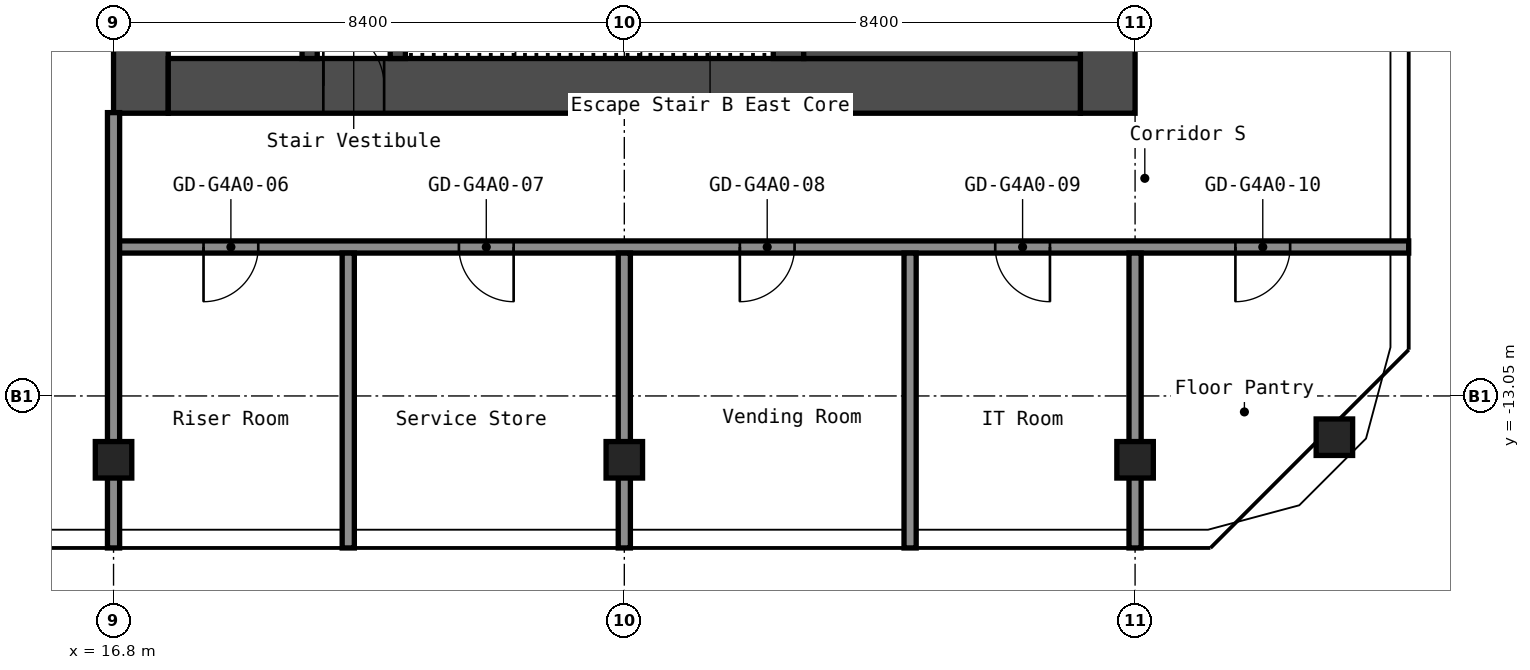
"""IFC4 building model, lengths in metres.
Left out: names, types, materials, properties, quantities, classifications, styles, units other than length and angle.
Written with IfcOpenShell. Run it as: python <this file> out.ifc"""

import sys

from ifc_helpers import new_model, si_unit, direction, frame, frame_2d, origin, origin_2d, place, context, subcontext, project, spatial, rectangle, hollow_rectangle, extrude, element, fill, save


model = new_model("IFC4")
c1 = context("Model", 3, precision=1e-05, world=origin(), true_north=direction((0.0, 1.0)))
c2 = subcontext(c1, "Body", "Model", "MODEL_VIEW")
j1 = project(units=[si_unit("LENGTHUNIT", "METRE"), si_unit("PLANEANGLEUNIT", "RADIAN")], contexts=[c1])
p1 = place(None, origin())
s1 = spatial("IfcSite", under=j1, at=p1, CompositionType="ELEMENT")
p2 = place(p1, origin())
s2 = spatial("IfcBuilding", under=s1, at=p2, CompositionType="ELEMENT")
p3 = place(p2, frame((0.0, 0.0, 186.6)))
s3 = spatial("IfcBuildingStorey", under=s2, at=p3, CompositionType="ELEMENT", Elevation=186.6)
for number, where, z_axis, x_axis in (
    (1, (16.8, -14.1, 0.0), (0.0, 0.0, 1.0), (1.0, 0.0, 0.0)),
    (2, (25.2, -14.1, 0.0), (0.0, 0.0, 1.0), (1.0, 0.0, 0.0)),
    (3, (33.6, -14.1, 0.0), (0.0, 0.0, 1.0), (1.0, 0.0, 0.0)),
    (4, (36.878, -13.729, 0.0), (0.0, 0.0, 1.0), (1.0, 0.0, 0.0)),
):
    element("IfcColumn", number, at=place(p3, frame(where, z_axis=z_axis, x_axis=x_axis)), inside=s3, PredefinedType="COLUMN", context=c2, shape_type="SweptSolid", body=[
        extrude(hollow_rectangle(XDim=0.6, YDim=0.6, WallThickness=0.025, InnerFilletRadius=0.038, OuterFilletRadius=0.062, at=origin_2d()), origin(), (0.0, 0.0, 1.0), 2.75),
    ])
p4 = place(p3, frame((17.25, -8.4, 0.0), z_axis=(0.0, 0.0, 1.0), x_axis=(0.0, 1.0, 0.0)))
e5 = element("IfcWall", 5, at=p4, inside=s3, PredefinedType="SHEAR", context=c2, shape_type="SweptSolid", body=[
    extrude(rectangle(XDim=16.8, YDim=0.9, at=frame_2d((8.4, 0.0))), origin(), (0.0, 0.0, 1.0), 2.75),
])
p5 = place(p4, frame((10.1, 0.0, 0.0)))
e6 = element("IfcOpeningElement", 6, at=p5, cuts=e5, PredefinedType="OPENING", context=c2, shape_type="SweptSolid", body=[
    extrude(rectangle(XDim=1.6, YDim=2.1, at=frame_2d((0.8, 1.05))), frame((0.0, 0.46, 0.0), z_axis=(0.0, -1.0, 0.0), x_axis=(1.0, 0.0, 0.0)), (0.0, 0.0, 1.0), 0.92),
])
p6 = place(p3, frame((33.15, -8.4, 0.0), z_axis=(0.0, 0.0, 1.0), x_axis=(0.0, 1.0, 0.0)))
e7 = element("IfcWall", 7, at=p6, inside=s3, PredefinedType="SHEAR", context=c2, shape_type="SweptSolid", body=[
    extrude(rectangle(XDim=16.8, YDim=0.9, at=frame_2d((8.4, 0.0))), origin(), (0.0, 0.0, 1.0), 2.75),
])
p7 = place(p3, frame((17.7, -7.95, 0.0), z_axis=(0.0, 0.0, 1.0), x_axis=(1.0, 0.0, 0.0)))
e8 = element("IfcWall", 8, at=p7, inside=s3, PredefinedType="SHEAR", context=c2, shape_type="SweptSolid", body=[
    extrude(rectangle(XDim=15.0, YDim=0.9, at=frame_2d((7.5, 0.0))), origin(), (0.0, 0.0, 1.0), 2.75),
])
p8 = place(p7, frame((2.55, 0.0, 0.0)))
e9 = element("IfcOpeningElement", 9, at=p8, cuts=e8, PredefinedType="OPENING", context=c2, shape_type="SweptSolid", body=[
    extrude(rectangle(XDim=1.0, YDim=2.1, at=frame_2d((0.5, 1.05))), frame((0.0, 0.46, 0.0), z_axis=(0.0, -1.0, 0.0), x_axis=(1.0, 0.0, 0.0)), (0.0, 0.0, 1.0), 0.92),
])
p9 = place(p3, frame((20.025, -7.5, 0.0), z_axis=(0.0, 0.0, 1.0), x_axis=(0.0, 1.0, 0.0)))
e10 = element("IfcWall", 10, at=p9, inside=s3, PredefinedType="SHEAR", context=c2, shape_type="SweptSolid", body=[
    extrude(rectangle(XDim=6.3, YDim=0.25, at=frame_2d((3.15, 0.0))), origin(), (0.0, 0.0, 1.0), 2.75),
])
p10 = place(p9, frame((2.4, 0.0, 0.0)))
e11 = element("IfcOpeningElement", 11, at=p10, cuts=e10, PredefinedType="OPENING", context=c2, shape_type="SweptSolid", body=[
    extrude(rectangle(XDim=1.0, YDim=2.1, at=frame_2d((0.5, 1.05))), frame((0.0, 0.135, 0.0), z_axis=(0.0, -1.0, 0.0), x_axis=(1.0, 0.0, 0.0)), (0.0, 0.0, 1.0), 0.27),
])
p11 = place(p3, frame((21.475, -7.5, 0.0), z_axis=(0.0, 0.0, 1.0), x_axis=(0.0, 1.0, 0.0)))
e12 = element("IfcWall", 12, at=p11, inside=s3, PredefinedType="SHEAR", context=c2, shape_type="SweptSolid", body=[
    extrude(rectangle(XDim=3.75, YDim=0.25, at=frame_2d((1.875, 0.0))), origin(), (0.0, 0.0, 1.0), 2.75),
])
p12 = place(p11, frame((1.3, 0.0, 0.0)))
e13 = element("IfcOpeningElement", 13, at=p12, cuts=e12, PredefinedType="OPENING", context=c2, shape_type="SweptSolid", body=[
    extrude(rectangle(XDim=1.2, YDim=2.1, at=frame_2d((0.6, 1.05))), frame((0.0, 0.135, 0.0), z_axis=(0.0, -1.0, 0.0), x_axis=(1.0, 0.0, 0.0)), (0.0, 0.0, 1.0), 0.27),
])
p13 = place(p3, frame((27.9, -7.5, 0.0), z_axis=(0.0, 0.0, 1.0), x_axis=(0.0, 1.0, 0.0)))
e14 = element("IfcWall", 14, at=p13, inside=s3, PredefinedType="SHEAR", context=c2, shape_type="SweptSolid", body=[
    extrude(rectangle(XDim=3.75, YDim=0.5, at=frame_2d((1.875, 0.0))), origin(), (0.0, 0.0, 1.0), 2.75),
])
p14 = place(p3, frame((28.15, -6.75, 0.0), z_axis=(0.0, 0.0, 1.0), x_axis=(1.0, 0.0, 0.0)))
e15 = element("IfcWall", 15, at=p14, inside=s3, PredefinedType="SHEAR", context=c2, shape_type="SweptSolid", body=[
    extrude(rectangle(XDim=4.55, YDim=1.5, at=frame_2d((2.275, 0.0))), origin(), (0.0, 0.0, 1.0), 2.75),
])
p15 = place(p3, frame((16.8, -10.6, 0.0), z_axis=(0.0, 0.0, 1.0), x_axis=(1.0, 0.0, 0.0)))
e16 = element("IfcWall", 16, at=p15, inside=s3, PredefinedType="PARTITIONING", context=c2, shape_type="SweptSolid", body=[
    extrude(rectangle(XDim=21.3, YDim=0.2, at=frame_2d((10.65, 0.0))), origin(), (0.0, 0.0, 1.0), 2.75),
])
p16 = place(p15, frame((1.48, 0.0, 0.0)))
e17 = element("IfcOpeningElement", 17, at=p16, cuts=e16, PredefinedType="OPENING", context=c2, shape_type="SweptSolid", body=[
    extrude(rectangle(XDim=0.9, YDim=2.1, at=frame_2d((0.45, 1.05))), frame((0.0, 0.11, 0.0), z_axis=(0.0, -1.0, 0.0), x_axis=(1.0, 0.0, 0.0)), (0.0, 0.0, 1.0), 0.22),
])
p17 = place(p15, frame((5.68, 0.0, 0.0)))
e18 = element("IfcOpeningElement", 18, at=p17, cuts=e16, PredefinedType="OPENING", context=c2, shape_type="SweptSolid", body=[
    extrude(rectangle(XDim=0.9, YDim=2.1, at=frame_2d((0.45, 1.05))), frame((0.0, 0.11, 0.0), z_axis=(0.0, -1.0, 0.0), x_axis=(1.0, 0.0, 0.0)), (0.0, 0.0, 1.0), 0.22),
])
p18 = place(p15, frame((10.3, 0.0, 0.0)))
e19 = element("IfcOpeningElement", 19, at=p18, cuts=e16, PredefinedType="OPENING", context=c2, shape_type="SweptSolid", body=[
    extrude(rectangle(XDim=0.9, YDim=2.1, at=frame_2d((0.45, 1.05))), frame((0.0, 0.11, 0.0), z_axis=(0.0, -1.0, 0.0), x_axis=(1.0, 0.0, 0.0)), (0.0, 0.0, 1.0), 0.22),
])
p19 = place(p15, frame((14.5, 0.0, 0.0)))
e20 = element("IfcOpeningElement", 20, at=p19, cuts=e16, PredefinedType="OPENING", context=c2, shape_type="SweptSolid", body=[
    extrude(rectangle(XDim=0.9, YDim=2.1, at=frame_2d((0.45, 1.05))), frame((0.0, 0.11, 0.0), z_axis=(0.0, -1.0, 0.0), x_axis=(1.0, 0.0, 0.0)), (0.0, 0.0, 1.0), 0.22),
])
p20 = place(p15, frame((18.45, 0.0, 0.0)))
e21 = element("IfcOpeningElement", 21, at=p20, cuts=e16, PredefinedType="OPENING", context=c2, shape_type="SweptSolid", body=[
    extrude(rectangle(XDim=0.9, YDim=2.1, at=frame_2d((0.45, 1.05))), frame((0.0, 0.11, 0.0), z_axis=(0.0, -1.0, 0.0), x_axis=(1.0, 0.0, 0.0)), (0.0, 0.0, 1.0), 0.22),
])
p21 = place(p3, frame((16.8, -15.55, 0.0), z_axis=(0.0, 0.0, 1.0), x_axis=(0.0, 1.0, 0.0)))
e22 = element("IfcWall", 22, at=p21, inside=s3, PredefinedType="PARTITIONING", context=c2, shape_type="SweptSolid", body=[
    extrude(rectangle(XDim=7.16, YDim=0.2, at=frame_2d((3.58, 0.0))), origin(), (0.0, 0.0, 1.0), 2.75),
])
for number, where, z_axis, x_axis in (
    (23, (20.66, -15.55, 0.0), (0.0, 0.0, 1.0), (0.0, 1.0, 0.0)),
    (24, (25.2, -15.55, 0.0), (0.0, 0.0, 1.0), (0.0, 1.0, 0.0)),
    (25, (29.9, -15.55, 0.0), (0.0, 0.0, 1.0), (0.0, 1.0, 0.0)),
    (26, (33.6, -15.55, 0.0), (0.0, 0.0, 1.0), (0.0, 1.0, 0.0)),
):
    element("IfcWall", number, at=place(p3, frame(where, z_axis=z_axis, x_axis=x_axis)), inside=s3, PredefinedType="PARTITIONING", context=c2, shape_type="SweptSolid", body=[
        extrude(rectangle(XDim=4.85, YDim=0.2, at=frame_2d((2.425, 0.0))), origin(), (0.0, 0.0, 1.0), 2.75),
    ])
p22 = place(p8, origin())
e27 = element("IfcDoor", 27, at=p22, inside=s3, OperationType="SINGLE_SWING_RIGHT", PredefinedType="DOOR", context=c2, shape_type="SweptSolid", body=[
    extrude(rectangle(XDim=1.0, YDim=2.1, at=frame_2d((0.5, 1.05))), frame((0.0, 0.025, 0.0), z_axis=(0.0, -1.0, 0.0), x_axis=(1.0, 0.0, 0.0)), (0.0, 0.0, 1.0), 0.05),
])
fill(e9, e27)
p23 = place(p16, origin())
e28 = element("IfcDoor", 28, at=p23, inside=s3, OperationType="SINGLE_SWING_LEFT", PredefinedType="DOOR", context=c2, shape_type="SweptSolid", body=[
    extrude(rectangle(XDim=0.9, YDim=2.1, at=frame_2d((0.45, 1.05))), frame((0.0, 0.025, 0.0), z_axis=(0.0, -1.0, 0.0), x_axis=(1.0, 0.0, 0.0)), (0.0, 0.0, 1.0), 0.05),
])
fill(e17, e28)
p24 = place(p17, origin())
e29 = element("IfcDoor", 29, at=p24, inside=s3, OperationType="SINGLE_SWING_RIGHT", PredefinedType="DOOR", context=c2, shape_type="SweptSolid", body=[
    extrude(rectangle(XDim=0.9, YDim=2.1, at=frame_2d((0.45, 1.05))), frame((0.0, 0.025, 0.0), z_axis=(0.0, -1.0, 0.0), x_axis=(1.0, 0.0, 0.0)), (0.0, 0.0, 1.0), 0.05),
])
fill(e18, e29)
p25 = place(p18, origin())
e30 = element("IfcDoor", 30, at=p25, inside=s3, OperationType="SINGLE_SWING_LEFT", PredefinedType="DOOR", context=c2, shape_type="SweptSolid", body=[
    extrude(rectangle(XDim=0.9, YDim=2.1, at=frame_2d((0.45, 1.05))), frame((0.0, 0.025, 0.0), z_axis=(0.0, -1.0, 0.0), x_axis=(1.0, 0.0, 0.0)), (0.0, 0.0, 1.0), 0.05),
])
fill(e19, e30)
p26 = place(p19, origin())
e31 = element("IfcDoor", 31, at=p26, inside=s3, OperationType="SINGLE_SWING_RIGHT", PredefinedType="DOOR", context=c2, shape_type="SweptSolid", body=[
    extrude(rectangle(XDim=0.9, YDim=2.1, at=frame_2d((0.45, 1.05))), frame((0.0, 0.025, 0.0), z_axis=(0.0, -1.0, 0.0), x_axis=(1.0, 0.0, 0.0)), (0.0, 0.0, 1.0), 0.05),
])
fill(e20, e31)
p27 = place(p20, origin())
e32 = element("IfcDoor", 32, at=p27, inside=s3, OperationType="SINGLE_SWING_LEFT", PredefinedType="DOOR", context=c2, shape_type="SweptSolid", body=[
    extrude(rectangle(XDim=0.9, YDim=2.1, at=frame_2d((0.45, 1.05))), frame((0.0, 0.025, 0.0), z_axis=(0.0, -1.0, 0.0), x_axis=(1.0, 0.0, 0.0)), (0.0, 0.0, 1.0), 0.05),
])
fill(e21, e32)
save(model, sys.argv[1])
